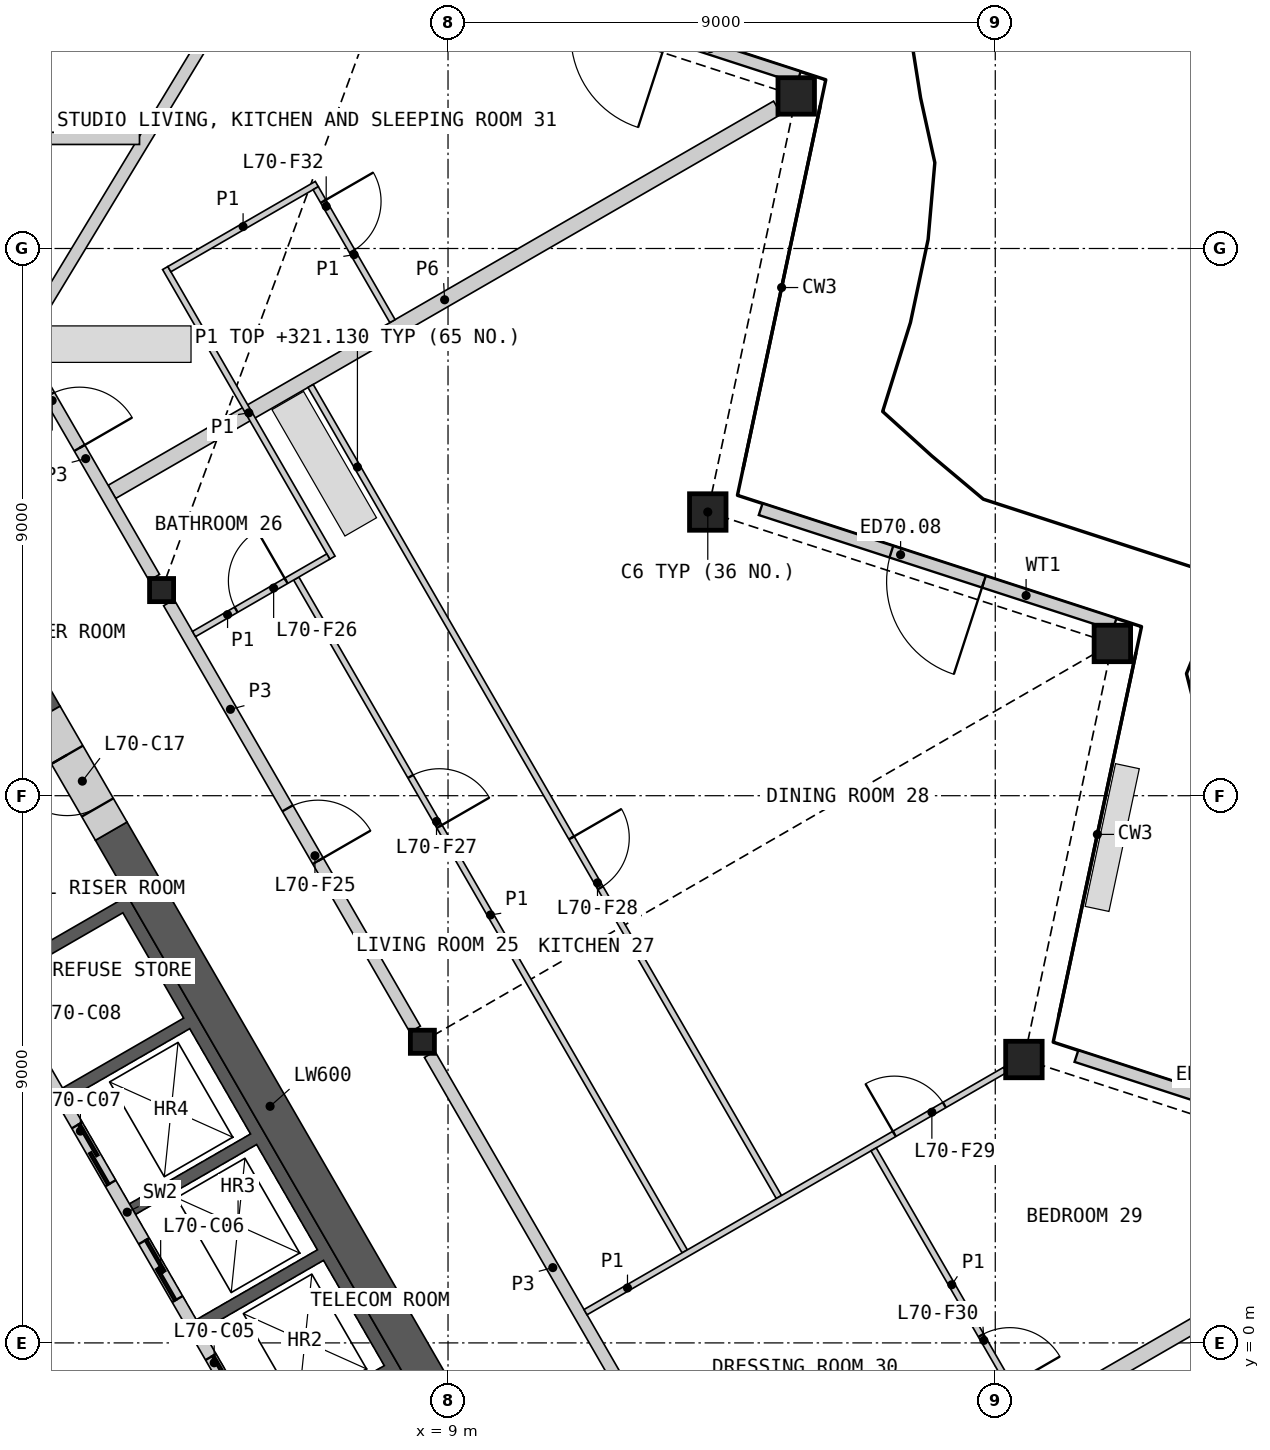
"""IFC4 building model, lengths in metres.
Left out: names, types, materials, properties, quantities, classifications, styles, units other than length and angle.
Written with IfcOpenShell. Run it as: python <this file> out.ifc"""

import sys

from ifc_helpers import new_model, si_unit, direction, frame, frame_2d, origin, origin_2d, place, context, subcontext, project, spatial, polyline, rectangle, hollow_rectangle, i_section, outline, extrude, element, fill, save


model = new_model("IFC4")
c1 = context("Model", 3, precision=1e-05, world=origin(), true_north=direction((0.0, 1.0)))
c2 = subcontext(c1, "Body", "Model", "MODEL_VIEW")
j1 = project(units=[si_unit("LENGTHUNIT", "METRE"), si_unit("PLANEANGLEUNIT", "RADIAN")], contexts=[c1])
p1 = place(None, origin())
s1 = spatial("IfcSite", under=j1, at=p1, CompositionType="ELEMENT")
p2 = place(p1, origin())
s2 = spatial("IfcBuilding", under=s1, at=p2, CompositionType="ELEMENT")
p3 = place(p2, frame((0.0, 0.0, 318.8)))
s3 = spatial("IfcBuildingStorey", under=s2, at=p3, CompositionType="ELEMENT", Elevation=318.8)
for number, where, z_axis, x_axis in (
    (1, (18.471, 4.661, 0.0), (0.0, 0.0, 1.0), (1.0, 0.0, 0.0)),
    (2, (19.926, 11.504, 0.0), (0.0, 0.0, 1.0), (1.0, 0.0, 0.0)),
    (3, (13.272, 13.666, 0.0), (0.0, 0.0, 1.0), (1.0, 0.0, 0.0)),
    (4, (14.727, 20.509, 0.0), (0.0, 0.0, 1.0), (1.0, 0.0, 0.0)),
):
    element("IfcColumn", number, at=place(p3, frame(where, z_axis=z_axis, x_axis=x_axis)), inside=s3, PredefinedType="COLUMN", context=c2, shape_type="SweptSolid", body=[
        extrude(hollow_rectangle(XDim=0.6, YDim=0.6, WallThickness=0.04, at=origin_2d()), origin(), (0.0, 0.0, 1.0), 3.4),
    ])
for number, where, z_axis, x_axis in (
    (5, (8.578, 4.953, 0.0), (0.0, 0.0, 1.0), (1.0, 0.0, 0.0)),
    (6, (4.289, 12.382, 0.0), (0.0, 0.0, 1.0), (1.0, 0.0, 0.0)),
):
    element("IfcColumn", number, at=place(p3, frame(where, z_axis=z_axis, x_axis=x_axis)), inside=s3, PredefinedType="COLUMN", context=c2, shape_type="SweptSolid", body=[
        extrude(i_section(OverallWidth=0.396, OverallDepth=0.381, WebThickness=0.019, FlangeThickness=0.03, at=origin_2d()), origin(), (0.0, 0.0, 1.0), 3.4),
    ])
p4 = place(p3, frame((25.155, 2.826, 0.0), z_axis=(0.0, 0.0, 1.0), x_axis=(-0.951053709789, 0.309025631781, 0.0)))
e7 = element("IfcWall", 7, at=p4, inside=s3, PredefinedType="SOLIDWALL", context=c2, shape_type="SweptSolid", body=[
    extrude(rectangle(XDim=6.12, YDim=0.2, at=frame_2d((3.06, 0.0))), origin(), (0.0, 0.0, 1.0), 2.488),
])
p5 = place(p4, frame((2.26, 0.0, 0.0)))
e8 = element("IfcOpeningElement", 8, at=p5, cuts=e7, PredefinedType="OPENING", context=c2, shape_type="SweptSolid", body=[
    extrude(rectangle(XDim=1.6, YDim=2.25, at=frame_2d((0.8, 1.125))), frame((0.0, 0.11, 0.0), z_axis=(0.0, -1.0, 0.0), x_axis=(1.0, 0.0, 0.0)), (0.0, 0.0, 1.0), 0.22),
])
p6 = place(p3, frame((19.962, 11.82, 0.0), z_axis=(0.0, 0.0, 1.0), x_axis=(-0.951053709789, 0.309025631781, 0.0)))
e9 = element("IfcWall", 9, at=p6, inside=s3, PredefinedType="SOLIDWALL", context=c2, shape_type="SweptSolid", body=[
    extrude(rectangle(XDim=6.12, YDim=0.2, at=frame_2d((3.06, 0.0))), origin(), (0.0, 0.0, 1.0), 2.488),
])
p7 = place(p6, frame((2.26, 0.0, 0.0)))
e10 = element("IfcOpeningElement", 10, at=p7, cuts=e9, PredefinedType="OPENING", context=c2, shape_type="SweptSolid", body=[
    extrude(rectangle(XDim=1.6, YDim=2.25, at=frame_2d((0.8, 1.125))), frame((0.0, 0.11, 0.0), z_axis=(0.0, -1.0, 0.0), x_axis=(1.0, 0.0, 0.0)), (0.0, 0.0, 1.0), 0.22),
])
p8 = place(p3, frame((14.769, 20.814, 0.0), z_axis=(0.0, 0.0, 1.0), x_axis=(-0.951069243123, 0.308977822483, 0.0)))
e11 = element("IfcWall", 11, at=p8, inside=s3, PredefinedType="SOLIDWALL", context=c2, shape_type="SweptSolid", body=[
    extrude(rectangle(XDim=6.12, YDim=0.2, at=frame_2d((3.06, 0.0))), origin(), (0.0, 0.0, 1.0), 2.488),
])
p9 = place(p8, frame((2.26, 0.0, 0.0)))
e12 = element("IfcOpeningElement", 12, at=p9, cuts=e11, PredefinedType="OPENING", context=c2, shape_type="SweptSolid", body=[
    extrude(rectangle(XDim=1.6, YDim=2.25, at=frame_2d((0.8, 1.125))), frame((0.0, 0.11, 0.0), z_axis=(0.0, -1.0, 0.0), x_axis=(1.0, 0.0, 0.0)), (0.0, 0.0, 1.0), 0.22),
])
p10 = place(p3, origin())
e13 = element("IfcWall", 13, at=p10, inside=s3, PredefinedType="SHEAR", context=c2, shape_type="SweptSolid", body=[
    extrude(outline(polyline([(1.561, 6.097), (3.731, 7.35), (8.231, -0.444), (6.061, -1.697), (5.96, -1.524), (7.952, -0.374), (6.952, 1.358), (4.96, 0.208), (4.861, 0.381), (6.852, 1.531), (5.852, 3.263), (3.861, 2.113), (3.76, 2.287), (5.752, 3.437), (4.752, 5.169), (2.76, 4.019), (2.66, 4.192), (4.652, 5.342), (3.652, 7.074), (1.66, 5.924), (1.561, 6.097)])), origin(), (0.0, 0.0, 1.0), 3.1),
])
p11 = place(p3, frame((5.817, -1.476, 0.0), z_axis=(0.0, 0.0, 1.0), x_axis=(-0.500002616675, 0.866023893041, 0.0)))
e14 = element("IfcWall", 14, at=p11, inside=s3, PredefinedType="SOLIDWALL", context=c2, shape_type="SweptSolid", body=[
    extrude(rectangle(XDim=8.373, YDim=0.2, at=frame_2d((4.187, 0.0))), origin(), (0.0, 0.0, 1.0), 3.1),
])
p12 = place(p11, frame((0.337, 0.0, 0.0)))
e15 = element("IfcOpeningElement", 15, at=p12, cuts=e14, PredefinedType="OPENING", context=c2, shape_type="SweptSolid", body=[
    extrude(rectangle(XDim=1.1, YDim=2.1, at=frame_2d((0.55, 1.05))), frame((0.0, 0.11, 0.0), z_axis=(0.0, -1.0, 0.0), x_axis=(1.0, 0.0, 0.0)), (0.0, 0.0, 1.0), 0.22),
])
p13 = place(p11, frame((2.537, 0.0, 0.0)))
e16 = element("IfcOpeningElement", 16, at=p13, cuts=e14, PredefinedType="OPENING", context=c2, shape_type="SweptSolid", body=[
    extrude(rectangle(XDim=1.1, YDim=2.1, at=frame_2d((0.55, 1.05))), frame((0.0, 0.11, 0.0), z_axis=(0.0, -1.0, 0.0), x_axis=(1.0, 0.0, 0.0)), (0.0, 0.0, 1.0), 0.22),
])
p14 = place(p11, frame((4.737, 0.0, 0.0)))
e17 = element("IfcOpeningElement", 17, at=p14, cuts=e14, PredefinedType="OPENING", context=c2, shape_type="SweptSolid", body=[
    extrude(rectangle(XDim=1.1, YDim=2.1, at=frame_2d((0.55, 1.05))), frame((0.0, 0.11, 0.0), z_axis=(0.0, -1.0, 0.0), x_axis=(1.0, 0.0, 0.0)), (0.0, 0.0, 1.0), 0.22),
])
p15 = place(p11, frame((7.037, 0.0, 0.0)))
e18 = element("IfcOpeningElement", 18, at=p15, cuts=e14, PredefinedType="OPENING", context=c2, shape_type="SweptSolid", body=[
    extrude(rectangle(XDim=0.9, YDim=2.1, at=frame_2d((0.45, 1.05))), frame((0.0, 0.11, 0.0), z_axis=(0.0, -1.0, 0.0), x_axis=(1.0, 0.0, 0.0)), (0.0, 0.0, 1.0), 0.22),
])
p16 = place(p3, frame((8.686, -0.634, 0.0), z_axis=(0.0, 0.0, 1.0), x_axis=(-0.50001836461, 0.866014800712, 0.0)))
e19 = element("IfcWall", 19, at=p16, inside=s3, PredefinedType="SHEAR", context=c2, shape_type="SweptSolid", body=[
    extrude(rectangle(XDim=10.451, YDim=0.6, at=frame_2d((5.225, 0.0))), origin(), (0.0, 0.0, 1.0), 3.1),
])
p17 = place(p3, frame((2.361, 10.322, 0.0), z_axis=(0.0, 0.0, 1.0), x_axis=(-0.500000735859, 0.866024978935, 0.0)))
e20 = element("IfcWall", 20, at=p17, inside=s3, PredefinedType="SHEAR", context=c2, shape_type="SweptSolid", body=[
    extrude(rectangle(XDim=4.202, YDim=0.6, at=frame_2d((2.101, 0.0))), origin(), (0.0, 0.0, 1.0), 3.1),
])
p18 = place(p3, frame((3.461, 8.417, 0.0), z_axis=(0.0, 0.0, 1.0), x_axis=(-0.499946605688, 0.86605622881, 0.0)))
e21 = element("IfcWall", 21, at=p18, inside=s3, PredefinedType="SHEAR", context=c2, shape_type="SweptSolid", body=[
    extrude(rectangle(XDim=2.2, YDim=0.6, at=frame_2d((1.1, 0.0))), origin(), (0.0, 0.0, 1.0), 3.1),
])
p19 = place(p18, frame((0.45, 0.0, 0.0)))
e22 = element("IfcOpeningElement", 22, at=p19, cuts=e21, PredefinedType="OPENING", context=c2, shape_type="SweptSolid", body=[
    extrude(rectangle(XDim=1.0, YDim=2.1, at=frame_2d((0.5, 1.05))), frame((0.0, 0.31, 0.0), z_axis=(0.0, -1.0, 0.0), x_axis=(1.0, 0.0, 0.0)), (0.0, 0.0, 1.0), 0.62),
])
p20 = place(p3, frame((3.472, 13.997, 0.0), z_axis=(0.0, 0.0, 1.0), x_axis=(0.866029233976, 0.499993365855, 0.0)))
e23 = element("IfcWall", 23, at=p20, inside=s3, PredefinedType="PARTITIONING", context=c2, shape_type="SweptSolid", body=[
    extrude(rectangle(XDim=12.637, YDim=0.25, at=frame_2d((6.319, 0.0))), origin(), (0.0, 0.0, 1.0), 2.33),
])
p21 = place(p3, frame((8.698, 4.745, 0.0), z_axis=(0.0, 0.0, 1.0), x_axis=(0.499984266882, -0.866034487114, 0.0)))
e24 = element("IfcWall", 24, at=p21, inside=s3, PredefinedType="PARTITIONING", context=c2, shape_type="SweptSolid", body=[
    extrude(rectangle(XDim=8.099, YDim=0.2, at=frame_2d((4.049, 0.0))), origin(), (0.0, 0.0, 1.0), 3.1),
])
p22 = place(p3, frame((4.409, 12.174, 0.0), z_axis=(0.0, 0.0, 1.0), x_axis=(0.499984266882, -0.866034487114, 0.0)))
e25 = element("IfcWall", 25, at=p22, inside=s3, PredefinedType="PARTITIONING", context=c2, shape_type="SweptSolid", body=[
    extrude(rectangle(XDim=8.099, YDim=0.2, at=frame_2d((4.049, 0.0))), origin(), (0.0, 0.0, 1.0), 3.1),
])
p23 = place(p22, frame((3.905, 0.0, 0.0)))
e26 = element("IfcOpeningElement", 26, at=p23, cuts=e25, PredefinedType="OPENING", context=c2, shape_type="SweptSolid", body=[
    extrude(rectangle(XDim=1.0, YDim=2.1, at=frame_2d((0.5, 1.05))), frame((0.0, 0.11, 0.0), z_axis=(0.0, -1.0, 0.0), x_axis=(1.0, 0.0, 0.0)), (0.0, 0.0, 1.0), 0.22),
])
p24 = place(p3, frame((18.454, -1.338, 0.0), z_axis=(0.0, 0.0, 1.0), x_axis=(0.866023407002, 0.500003458512, 0.0)))
e27 = element("IfcWall", 27, at=p24, inside=s3, PredefinedType="PARTITIONING", context=c2, shape_type="SweptSolid", body=[
    extrude(rectangle(XDim=7.345, YDim=0.25, at=frame_2d((3.673, 0.0))), origin(), (0.0, 0.0, 1.0), 2.33),
])
p25 = place(p3, frame((1.913, 16.498, 0.0), z_axis=(0.0, 0.0, 1.0), x_axis=(0.499950370306, -0.866054055606, 0.0)))
e28 = element("IfcWall", 28, at=p25, inside=s3, PredefinedType="PARTITIONING", context=c2, shape_type="SweptSolid", body=[
    extrude(rectangle(XDim=4.513, YDim=0.2, at=frame_2d((2.256, 0.0))), origin(), (0.0, 0.0, 1.0), 3.1),
])
p26 = place(p25, frame((1.053, 0.0, 0.0)))
e29 = element("IfcOpeningElement", 29, at=p26, cuts=e28, PredefinedType="OPENING", context=c2, shape_type="SweptSolid", body=[
    extrude(rectangle(XDim=1.0, YDim=2.1, at=frame_2d((0.5, 1.05))), frame((0.0, 0.11, 0.0), z_axis=(0.0, -1.0, 0.0), x_axis=(1.0, 0.0, 0.0)), (0.0, 0.0, 1.0), 0.22),
])
p27 = place(p3, frame((2.015, 16.497, 0.0), z_axis=(0.0, 0.0, 1.0), x_axis=(0.517779253395, 0.855514257482, 0.0)))
e30 = element("IfcWall", 30, at=p27, inside=s3, PredefinedType="PARTITIONING", context=c2, shape_type="SweptSolid", body=[
    extrude(rectangle(XDim=14.854, YDim=0.2, at=frame_2d((7.427, 0.0))), origin(), (0.0, 0.0, 1.0), 2.33),
])
p28 = place(p3, frame((0.208, 19.811, 0.0), z_axis=(0.0, 0.0, 1.0), x_axis=(1.0, 0.0, 0.0)))
e31 = element("IfcWall", 31, at=p28, inside=s3, PredefinedType="PARTITIONING", context=c2, shape_type="SweptSolid", body=[
    extrude(rectangle(XDim=3.718, YDim=0.2, at=frame_2d((1.859, 0.0))), origin(), (0.0, 0.0, 1.0), 2.33),
])
p29 = place(p3, frame((6.74, 15.739, 0.0), z_axis=(0.0, 0.0, 1.0), x_axis=(0.499995022685, -0.86602827742, 0.0)))
e32 = element("IfcWall", 32, at=p29, inside=s3, PredefinedType="PARTITIONING", context=c2, shape_type="SweptSolid", body=[
    extrude(rectangle(XDim=15.404, YDim=0.1, at=frame_2d((7.702, 0.0))), origin(), (0.0, 0.0, 1.0), 2.33),
])
p30 = place(p29, frame((8.582, 0.0, 0.0)))
e33 = element("IfcOpeningElement", 33, at=p30, cuts=e32, PredefinedType="OPENING", context=c2, shape_type="SweptSolid", body=[
    extrude(rectangle(XDim=0.95, YDim=2.1, at=frame_2d((0.475, 1.05))), frame((0.0, 0.06, 0.0), z_axis=(0.0, -1.0, 0.0), x_axis=(1.0, 0.0, 0.0)), (0.0, 0.0, 1.0), 0.12),
])
p31 = place(p3, frame((6.504, 12.572, 0.0), z_axis=(0.0, 0.0, 1.0), x_axis=(0.499998094172, -0.866026504112, 0.0)))
e34 = element("IfcWall", 34, at=p31, inside=s3, PredefinedType="PARTITIONING", context=c2, shape_type="SweptSolid", body=[
    extrude(rectangle(XDim=12.778, YDim=0.1, at=frame_2d((6.389, 0.0))), origin(), (0.0, 0.0, 1.0), 2.33),
])
p32 = place(p31, frame((3.759, 0.0, 0.0)))
e35 = element("IfcOpeningElement", 35, at=p32, cuts=e34, PredefinedType="OPENING", context=c2, shape_type="SweptSolid", body=[
    extrude(rectangle(XDim=0.95, YDim=2.1, at=frame_2d((0.475, 1.05))), frame((0.0, 0.06, 0.0), z_axis=(0.0, -1.0, 0.0), x_axis=(1.0, 0.0, 0.0)), (0.0, 0.0, 1.0), 0.12),
])
p33 = place(p3, frame((11.261, 0.506, 0.0), z_axis=(0.0, 0.0, 1.0), x_axis=(0.866024323732, 0.500001870701, 0.0)))
e36 = element("IfcWall", 36, at=p33, inside=s3, PredefinedType="PARTITIONING", context=c2, shape_type="SweptSolid", body=[
    extrude(rectangle(XDim=7.967, YDim=0.1, at=frame_2d((3.983, 0.0))), origin(), (0.0, 0.0, 1.0), 2.33),
])
p34 = place(p33, frame((5.865, 0.0, 0.0)))
e37 = element("IfcOpeningElement", 37, at=p34, cuts=e36, PredefinedType="OPENING", context=c2, shape_type="SweptSolid", body=[
    extrude(rectangle(XDim=0.95, YDim=2.1, at=frame_2d((0.475, 1.05))), frame((0.0, 0.06, 0.0), z_axis=(0.0, -1.0, 0.0), x_axis=(1.0, 0.0, 0.0)), (0.0, 0.0, 1.0), 0.12),
])
p35 = place(p3, frame((4.349, 17.679, 0.0), z_axis=(0.0, 0.0, 1.0), x_axis=(0.49997732567, -0.866038494419, 0.0)))
e38 = element("IfcWall", 38, at=p35, inside=s3, PredefinedType="PARTITIONING", context=c2, shape_type="SweptSolid", body=[
    extrude(rectangle(XDim=5.5, YDim=0.1, at=frame_2d((2.75, 0.0))), origin(), (0.0, 0.0, 1.0), 2.33),
])
p36 = place(p3, frame((15.999, 3.183, 0.0), z_axis=(0.0, 0.0, 1.0), x_axis=(0.500014207086, -0.866017201164, 0.0)))
e39 = element("IfcWall", 39, at=p36, inside=s3, PredefinedType="PARTITIONING", context=c2, shape_type="SweptSolid", body=[
    extrude(rectangle(XDim=5.143, YDim=0.1, at=frame_2d((2.571, 0.0))), origin(), (0.0, 0.0, 1.0), 2.33),
])
p37 = place(p36, frame((3.532, 0.0, 0.0)))
e40 = element("IfcOpeningElement", 40, at=p37, cuts=e39, PredefinedType="OPENING", context=c2, shape_type="SweptSolid", body=[
    extrude(rectangle(XDim=0.95, YDim=2.1, at=frame_2d((0.475, 1.05))), frame((0.0, 0.06, 0.0), z_axis=(0.0, -1.0, 0.0), x_axis=(1.0, 0.0, 0.0)), (0.0, 0.0, 1.0), 0.12),
])
p38 = place(p3, frame((4.417, 17.66, 0.0), z_axis=(0.0, 0.0, 1.0), x_axis=(0.866034573852, 0.49998411664, 0.0)))
e41 = element("IfcWall", 41, at=p38, inside=s3, PredefinedType="PARTITIONING", context=c2, shape_type="SweptSolid", body=[
    extrude(rectangle(XDim=2.8, YDim=0.1, at=frame_2d((1.4, 0.0))), origin(), (0.0, 0.0, 1.0), 2.33),
])
p39 = place(p3, frame((6.824, 18.992, 0.0), z_axis=(0.0, 0.0, 1.0), x_axis=(0.50001820224, -0.866014894461, 0.0)))
e42 = element("IfcWall", 42, at=p39, inside=s3, PredefinedType="PARTITIONING", context=c2, shape_type="SweptSolid", body=[
    extrude(rectangle(XDim=2.525, YDim=0.1, at=frame_2d((1.262, 0.0))), origin(), (0.0, 0.0, 1.0), 2.33),
])
p40 = place(p39, frame((0.25, 0.0, 0.0)))
e43 = element("IfcOpeningElement", 43, at=p40, cuts=e42, PredefinedType="OPENING", context=c2, shape_type="SweptSolid", body=[
    extrude(rectangle(XDim=0.95, YDim=2.1, at=frame_2d((0.475, 1.05))), frame((0.0, 0.06, 0.0), z_axis=(0.0, -1.0, 0.0), x_axis=(1.0, 0.0, 0.0)), (0.0, 0.0, 1.0), 0.12),
])
p41 = place(p3, frame((4.822, 11.659, 0.0), z_axis=(0.0, 0.0, 1.0), x_axis=(0.866030925526, 0.499990435942, 0.0)))
e44 = element("IfcWall", 44, at=p41, inside=s3, PredefinedType="PARTITIONING", context=c2, shape_type="SweptSolid", body=[
    extrude(rectangle(XDim=2.55, YDim=0.1, at=frame_2d((1.275, 0.0))), origin(), (0.0, 0.0, 1.0), 2.33),
])
p42 = place(p41, frame((0.8, 0.0, 0.0)))
e45 = element("IfcOpeningElement", 45, at=p42, cuts=e44, PredefinedType="OPENING", context=c2, shape_type="SweptSolid", body=[
    extrude(rectangle(XDim=0.95, YDim=2.1, at=frame_2d((0.475, 1.05))), frame((0.0, 0.06, 0.0), z_axis=(0.0, -1.0, 0.0), x_axis=(1.0, 0.0, 0.0)), (0.0, 0.0, 1.0), 0.12),
])
p43 = place(p7, origin())
e46 = element("IfcDoor", 46, at=p43, inside=s3, OperationType="DOUBLE_DOOR_SINGLE_SWING", PredefinedType="DOOR", context=c2, shape_type="SweptSolid", body=[
    extrude(rectangle(XDim=1.6, YDim=2.25, at=frame_2d((0.8, 1.125))), frame((0.0, 0.025, 0.0), z_axis=(0.0, -1.0, 0.0), x_axis=(1.0, 0.0, 0.0)), (0.0, 0.0, 1.0), 0.05),
])
fill(e10, e46)
p44 = place(p12, origin())
e47 = element("IfcDoor", 47, at=p44, inside=s3, OperationType="SLIDING_TO_LEFT", PredefinedType="DOOR", context=c2, shape_type="SweptSolid", body=[
    extrude(rectangle(XDim=1.1, YDim=2.1, at=frame_2d((0.55, 1.05))), frame((0.0, 0.025, 0.0), z_axis=(0.0, -1.0, 0.0), x_axis=(1.0, 0.0, 0.0)), (0.0, 0.0, 1.0), 0.05),
])
fill(e15, e47)
p45 = place(p13, origin())
e48 = element("IfcDoor", 48, at=p45, inside=s3, OperationType="SLIDING_TO_LEFT", PredefinedType="DOOR", context=c2, shape_type="SweptSolid", body=[
    extrude(rectangle(XDim=1.1, YDim=2.1, at=frame_2d((0.55, 1.05))), frame((0.0, 0.025, 0.0), z_axis=(0.0, -1.0, 0.0), x_axis=(1.0, 0.0, 0.0)), (0.0, 0.0, 1.0), 0.05),
])
fill(e16, e48)
p46 = place(p14, origin())
e49 = element("IfcDoor", 49, at=p46, inside=s3, OperationType="SLIDING_TO_LEFT", PredefinedType="DOOR", context=c2, shape_type="SweptSolid", body=[
    extrude(rectangle(XDim=1.1, YDim=2.1, at=frame_2d((0.55, 1.05))), frame((0.0, 0.025, 0.0), z_axis=(0.0, -1.0, 0.0), x_axis=(1.0, 0.0, 0.0)), (0.0, 0.0, 1.0), 0.05),
])
fill(e17, e49)
p47 = place(p19, origin())
e50 = element("IfcDoor", 50, at=p47, inside=s3, OperationType="SINGLE_SWING_RIGHT", PredefinedType="DOOR", context=c2, shape_type="SweptSolid", body=[
    extrude(rectangle(XDim=1.0, YDim=2.1, at=frame_2d((0.5, 1.05))), frame((0.0, 0.055, 0.0), z_axis=(0.0, -1.0, 0.0), x_axis=(1.0, 0.0, 0.0)), (0.0, 0.0, 1.0), 0.05),
])
fill(e22, e50)
p48 = place(p23, origin())
e51 = element("IfcDoor", 51, at=p48, inside=s3, OperationType="SINGLE_SWING_RIGHT", PredefinedType="DOOR", context=c2, shape_type="SweptSolid", body=[
    extrude(rectangle(XDim=1.0, YDim=2.1, at=frame_2d((0.5, 1.05))), frame((0.0, 0.025, 0.0), z_axis=(0.0, -1.0, 0.0), x_axis=(1.0, 0.0, 0.0)), (0.0, 0.0, 1.0), 0.05),
])
fill(e26, e51)
p49 = place(p42, origin())
e52 = element("IfcDoor", 52, at=p49, inside=s3, OperationType="SINGLE_SWING_RIGHT", PredefinedType="DOOR", context=c2, shape_type="SweptSolid", body=[
    extrude(rectangle(XDim=0.95, YDim=2.1, at=frame_2d((0.475, 1.05))), frame((0.0, 0.025, 0.0), z_axis=(0.0, -1.0, 0.0), x_axis=(1.0, 0.0, 0.0)), (0.0, 0.0, 1.0), 0.05),
])
fill(e45, e52)
p50 = place(p32, origin())
e53 = element("IfcDoor", 53, at=p50, inside=s3, OperationType="SINGLE_SWING_RIGHT", PredefinedType="DOOR", context=c2, shape_type="SweptSolid", body=[
    extrude(rectangle(XDim=0.95, YDim=2.1, at=frame_2d((0.475, 1.05))), frame((0.0, 0.025, 0.0), z_axis=(0.0, -1.0, 0.0), x_axis=(1.0, 0.0, 0.0)), (0.0, 0.0, 1.0), 0.05),
])
fill(e35, e53)
p51 = place(p30, origin())
e54 = element("IfcDoor", 54, at=p51, inside=s3, OperationType="SINGLE_SWING_LEFT", PredefinedType="DOOR", context=c2, shape_type="SweptSolid", body=[
    extrude(rectangle(XDim=0.95, YDim=2.1, at=frame_2d((0.475, 1.05))), frame((0.0, 0.025, 0.0), z_axis=(0.0, -1.0, 0.0), x_axis=(1.0, 0.0, 0.0)), (0.0, 0.0, 1.0), 0.05),
])
fill(e33, e54)
p52 = place(p34, origin())
e55 = element("IfcDoor", 55, at=p52, inside=s3, OperationType="SINGLE_SWING_LEFT", PredefinedType="DOOR", context=c2, shape_type="SweptSolid", body=[
    extrude(rectangle(XDim=0.95, YDim=2.1, at=frame_2d((0.475, 1.05))), frame((0.0, 0.025, 0.0), z_axis=(0.0, -1.0, 0.0), x_axis=(1.0, 0.0, 0.0)), (0.0, 0.0, 1.0), 0.05),
])
fill(e37, e55)
p53 = place(p37, origin())
e56 = element("IfcDoor", 56, at=p53, inside=s3, OperationType="SINGLE_SWING_RIGHT", PredefinedType="DOOR", context=c2, shape_type="SweptSolid", body=[
    extrude(rectangle(XDim=0.95, YDim=2.1, at=frame_2d((0.475, 1.05))), frame((0.0, 0.025, 0.0), z_axis=(0.0, -1.0, 0.0), x_axis=(1.0, 0.0, 0.0)), (0.0, 0.0, 1.0), 0.05),
])
fill(e40, e56)
p54 = place(p26, origin())
e57 = element("IfcDoor", 57, at=p54, inside=s3, OperationType="SINGLE_SWING_RIGHT", PredefinedType="DOOR", context=c2, shape_type="SweptSolid", body=[
    extrude(rectangle(XDim=1.0, YDim=2.1, at=frame_2d((0.5, 1.05))), frame((0.0, 0.025, 0.0), z_axis=(0.0, -1.0, 0.0), x_axis=(1.0, 0.0, 0.0)), (0.0, 0.0, 1.0), 0.05),
])
fill(e29, e57)
p55 = place(p40, origin())
e58 = element("IfcDoor", 58, at=p55, inside=s3, OperationType="SINGLE_SWING_LEFT", PredefinedType="DOOR", context=c2, shape_type="SweptSolid", body=[
    extrude(rectangle(XDim=0.95, YDim=2.1, at=frame_2d((0.475, 1.05))), frame((0.0, 0.025, 0.0), z_axis=(0.0, -1.0, 0.0), x_axis=(1.0, 0.0, 0.0)), (0.0, 0.0, 1.0), 0.05),
])
fill(e43, e58)
save(model, sys.argv[1])
